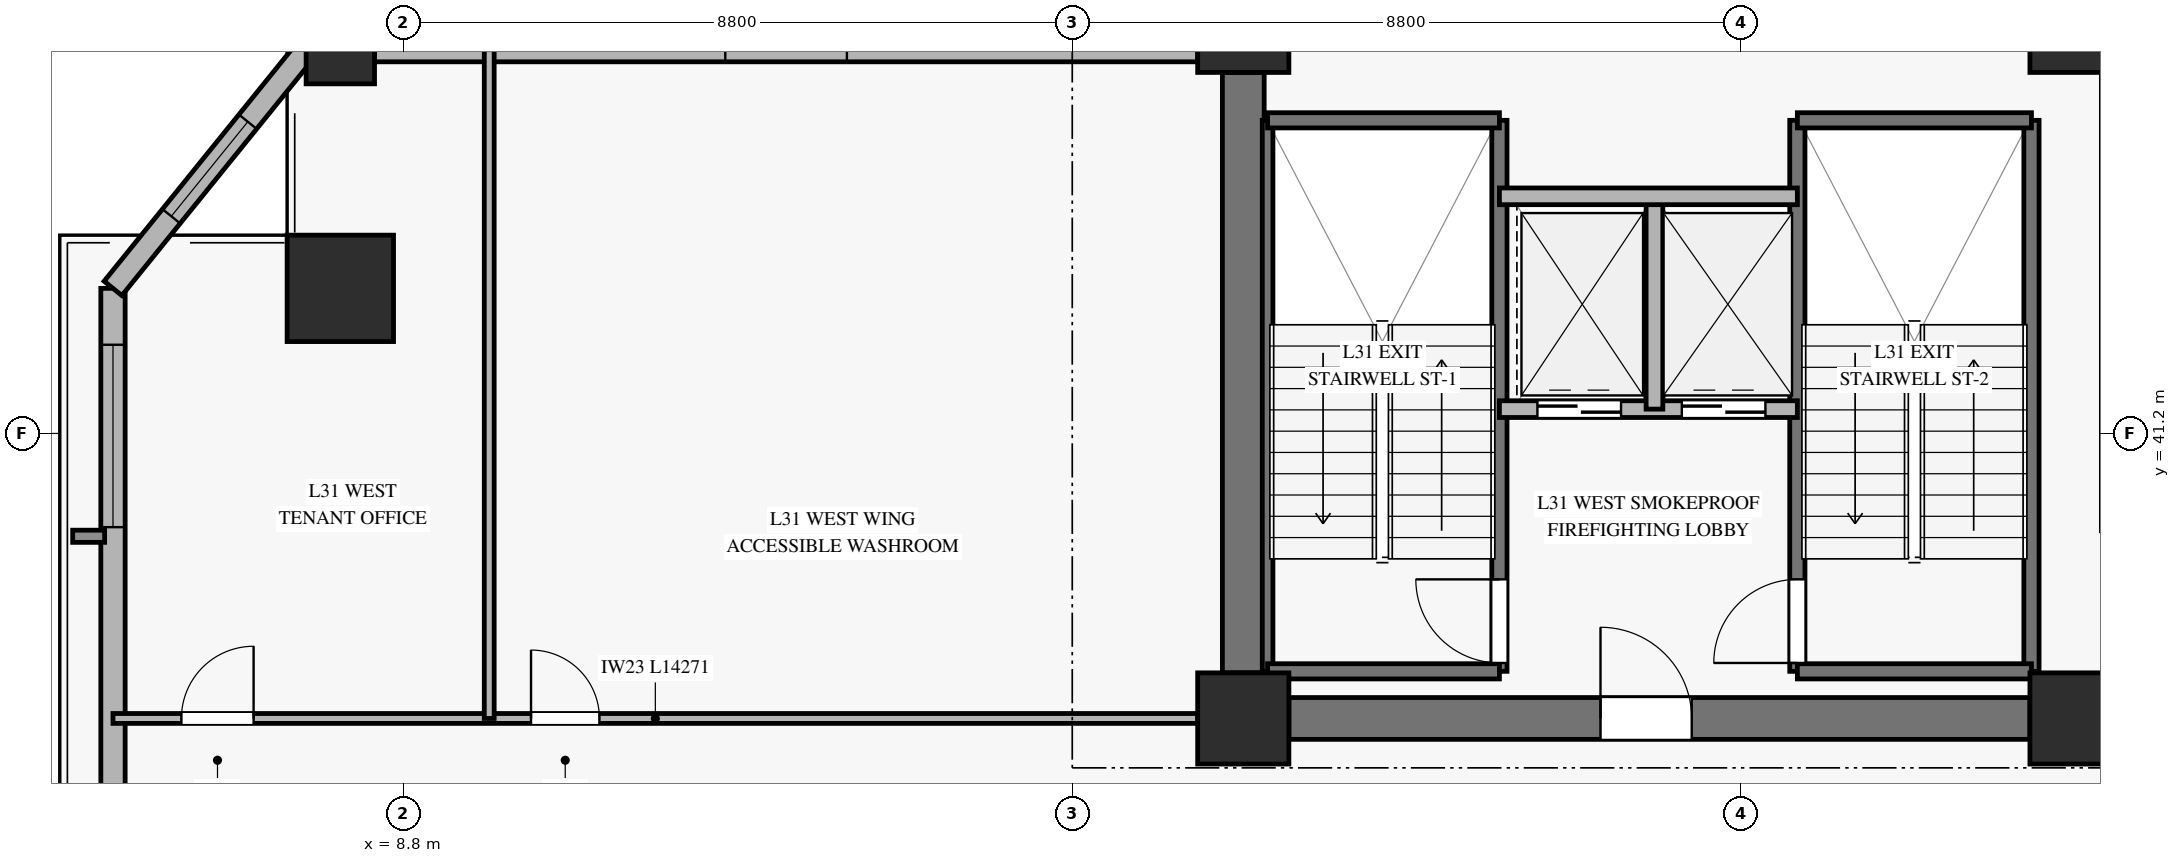
"""IFC4 building model, lengths in metres.
Left out: names, types, materials, properties, quantities, classifications, styles, units other than length and angle.
Written with IfcOpenShell. Run it as: python <this file> out.ifc"""

import sys

from ifc_helpers import new_model, si_unit, direction, frame, frame_2d, origin, origin_2d, place, context, subcontext, project, spatial, rectangle, hollow_rectangle, extrude, source, transform, mapped, element, fill, save


model = new_model("IFC4")
c1 = context("Model", 3, precision=1e-05, world=origin(), true_north=direction((0.0, 1.0)))
c2 = subcontext(c1, "Body", "Model", "MODEL_VIEW")
j1 = project(units=[si_unit("LENGTHUNIT", "METRE"), si_unit("PLANEANGLEUNIT", "RADIAN")], contexts=[c1])
p1 = place(None, origin())
s1 = spatial("IfcSite", under=j1, at=p1, CompositionType="ELEMENT")
p2 = place(p1, origin())
s2 = spatial("IfcBuilding", under=s1, at=p2, CompositionType="ELEMENT")
p3 = place(p2, frame((0.0, 0.0, 127.0)))
s3 = spatial("IfcBuildingStorey", under=s2, at=p3, CompositionType="ELEMENT", Elevation=127.0)
m1 = source(origin(), c2, "Body", "SweptSolid", [
    extrude(rectangle(XDim=1.2, YDim=1.2, at=origin_2d()), origin(), (0.0, 0.0, 1.0), 3.64),
])
for number, where, z_axis, x_axis in (
    (1, (19.85, 37.45, 0.0), (0.0, 0.0, 1.0), (1.0, 0.0, 0.0)),
    (2, (19.85, 46.55, 0.0), (0.0, 0.0, 1.0), (1.0, 0.0, 0.0)),
    (3, (30.8, 37.45, 0.0), (0.0, 0.0, 1.0), (1.0, 0.0, 0.0)),
    (4, (30.8, 46.55, 0.0), (0.0, 0.0, 1.0), (1.0, 0.0, 0.0)),
):
    element("IfcColumn", number, at=place(p3, frame(where, z_axis=z_axis, x_axis=x_axis)), inside=s3, PredefinedType="PILASTER", context=c2, shape_type="MappedRepresentation", body=[
        mapped(m1, transform((0.0, 0.0, 0.0), x_axis=(1.0, 0.0, 0.0), y_axis=(0.0, 1.0, 0.0), z_axis=(0.0, 0.0, 1.0), scale=1.0)),
    ])
p4 = place(p3, frame((20.45, 37.45, 0.0), z_axis=(0.0, 0.0, 1.0), x_axis=(1.0, 0.0, 0.0)))
e5 = element("IfcWall", 5, at=p4, inside=s3, PredefinedType="SHEAR", context=c2, shape_type="SweptSolid", body=[
    extrude(rectangle(XDim=9.75, YDim=0.55, at=frame_2d((4.875, 0.0))), origin(), (0.0, 0.0, 1.0), 3.64),
])
p5 = place(p4, frame((4.1, 0.0, 0.0)))
e6 = element("IfcOpeningElement", 6, at=p5, cuts=e5, PredefinedType="OPENING", context=c2, shape_type="SweptSolid", body=[
    extrude(rectangle(XDim=1.2, YDim=2.15, at=frame_2d((0.6, 1.075))), frame((0.0, 0.285, 0.0), z_axis=(0.0, -1.0, 0.0), x_axis=(1.0, 0.0, 0.0)), (0.0, 0.0, 1.0), 0.57),
])
p6 = place(p3, frame((19.85, 38.05, 0.0), z_axis=(0.0, 0.0, 1.0), x_axis=(0.0, 1.0, 0.0)))
e7 = element("IfcWall", 7, at=p6, inside=s3, PredefinedType="SHEAR", context=c2, shape_type="SweptSolid", body=[
    extrude(rectangle(XDim=7.9, YDim=0.55, at=frame_2d((3.95, 0.0))), origin(), (0.0, 0.0, 1.0), 3.64),
])
m2 = source(origin(), c2, "Body", "SweptSolid", [
    extrude(hollow_rectangle(XDim=1.4, YDim=1.4, WallThickness=0.065, at=origin_2d()), origin(), (0.0, 0.0, 1.0), 3.64),
])
p7 = place(p3, frame((7.97, 43.109, 0.0), z_axis=(0.0, 0.0, 1.0), x_axis=(1.0, 0.0, 0.0)))
e8 = element("IfcColumn", 8, at=p7, inside=s3, PredefinedType="COLUMN", context=c2, shape_type="MappedRepresentation", body=[
    mapped(m2, transform((0.0, 0.0, 0.0), x_axis=(1.0, 0.0, 0.0), y_axis=(0.0, 1.0, 0.0), z_axis=(0.0, 0.0, 1.0), scale=1.0)),
])
m3 = source(origin(), c2, "Body", "SweptSolid", [
    extrude(hollow_rectangle(XDim=0.9, YDim=0.9, WallThickness=0.04, at=origin_2d()), origin(), (0.0, 0.0, 1.0), 3.64),
])
p8 = place(p3, frame((7.97, 46.25, 0.0), z_axis=(0.0, 0.0, 1.0), x_axis=(1.0, 0.0, 0.0)))
e9 = element("IfcColumn", 9, at=p8, inside=s3, PredefinedType="COLUMN", context=c2, shape_type="MappedRepresentation", body=[
    mapped(m3, transform((0.0, 0.0, 0.0), x_axis=(1.0, 0.0, 0.0), y_axis=(0.0, 1.0, 0.0), z_axis=(0.0, 0.0, 1.0), scale=1.0)),
])
p9 = place(p3, frame((4.979, 27.259, 0.0), z_axis=(0.0, 0.0, 1.0), x_axis=(0.0, 1.0, 0.0)))
e10 = element("IfcWall", 10, at=p9, inside=s3, PredefinedType="SOLIDWALL", context=c2, shape_type="SweptSolid", body=[
    extrude(rectangle(XDim=15.85, YDim=0.32, at=frame_2d((7.925, 0.0))), origin(), (0.0, 0.0, 1.0), 3.12),
])
p10 = place(p9, frame((2.241, 0.0, 0.45)))
e11 = element("IfcOpeningElement", 11, at=p10, cuts=e10, PredefinedType="OPENING", context=c2, shape_type="SweptSolid", body=[
    extrude(rectangle(XDim=2.4, YDim=2.1, at=frame_2d((1.2, 1.05))), frame((0.0, 0.17, 0.0), z_axis=(0.0, -1.0, 0.0), x_axis=(1.0, 0.0, 0.0)), (0.0, 0.0, 1.0), 0.34),
])
p11 = place(p9, frame((12.708, 0.0, 0.45)))
e12 = element("IfcOpeningElement", 12, at=p11, cuts=e10, PredefinedType="OPENING", context=c2, shape_type="SweptSolid", body=[
    extrude(rectangle(XDim=2.4, YDim=2.1, at=frame_2d((1.2, 1.05))), frame((0.0, 0.17, 0.0), z_axis=(0.0, -1.0, 0.0), x_axis=(1.0, 0.0, 0.0)), (0.0, 0.0, 1.0), 0.34),
])
p12 = place(p3, frame((8.42, 46.25, 0.0), z_axis=(0.0, 0.0, 1.0), x_axis=(1.0, 0.0, 0.0)))
e13 = element("IfcWall", 13, at=p12, inside=s3, PredefinedType="SOLIDWALL", context=c2, shape_type="SweptSolid", body=[
    extrude(rectangle(XDim=10.83, YDim=0.32, at=frame_2d((5.415, 0.0))), origin(), (0.0, 0.0, 1.0), 3.12),
])
p13 = place(p12, frame((4.615, 0.0, 0.45)))
e14 = element("IfcOpeningElement", 14, at=p13, cuts=e13, PredefinedType="OPENING", context=c2, shape_type="SweptSolid", body=[
    extrude(rectangle(XDim=1.6, YDim=2.0, at=frame_2d((0.8, 1.0))), frame((0.0, 0.17, 0.0), z_axis=(0.0, -1.0, 0.0), x_axis=(1.0, 0.0, 0.0)), (0.0, 0.0, 1.0), 0.34),
])
p14 = place(p3, frame((7.52, 46.25, 0.0), z_axis=(0.0, 0.0, 1.0), x_axis=(-0.62893048879, -0.7774615362, 0.0)))
e15 = element("IfcWall", 15, at=p14, inside=s3, PredefinedType="SOLIDWALL", context=c2, shape_type="SweptSolid", body=[
    extrude(rectangle(XDim=4.04, YDim=0.3, at=frame_2d((2.02, 0.0))), origin(), (0.0, 0.0, 1.0), 3.12),
])
p15 = place(p14, frame((1.22, 0.0, 0.45)))
e16 = element("IfcOpeningElement", 16, at=p15, cuts=e15, PredefinedType="OPENING", context=c2, shape_type="SweptSolid", body=[
    extrude(rectangle(XDim=1.6, YDim=2.0, at=frame_2d((0.8, 1.0))), frame((0.0, 0.16, 0.0), z_axis=(0.0, -1.0, 0.0), x_axis=(1.0, 0.0, 0.0)), (0.0, 0.0, 1.0), 0.32),
])
p16 = place(p3, frame((20.17, 38.07, 0.0), z_axis=(0.0, 0.0, 1.0), x_axis=(0.0, 1.0, 0.0)))
e17 = element("IfcWall", 17, at=p16, inside=s3, PredefinedType="SOLIDWALL", context=c2, shape_type="SweptSolid", body=[
    extrude(rectangle(XDim=7.25, YDim=0.14, at=frame_2d((3.625, 0.0))), origin(), (0.0, 0.0, 1.0), 3.9),
])
p17 = place(p3, frame((23.22, 38.07, 0.0), z_axis=(0.0, 0.0, 1.0), x_axis=(0.0, 1.0, 0.0)))
e18 = element("IfcWall", 18, at=p17, inside=s3, PredefinedType="SOLIDWALL", context=c2, shape_type="SweptSolid", body=[
    extrude(rectangle(XDim=7.25, YDim=0.2, at=frame_2d((3.625, 0.0))), origin(), (0.0, 0.0, 1.0), 3.9),
])
p18 = place(p17, frame((0.11, 0.0, 0.0)))
e19 = element("IfcOpeningElement", 19, at=p18, cuts=e18, PredefinedType="OPENING", context=c2, shape_type="SweptSolid", body=[
    extrude(rectangle(XDim=1.1, YDim=2.15, at=frame_2d((0.55, 1.075))), frame((0.0, 0.11, 0.0), z_axis=(0.0, -1.0, 0.0), x_axis=(1.0, 0.0, 0.0)), (0.0, 0.0, 1.0), 0.22),
])
for number, where, z_axis, x_axis in (
    (20, (20.17, 45.32, 0.0), (0.0, 0.0, 1.0), (1.0, 0.0, 0.0)),
    (21, (20.17, 38.07, 0.0), (0.0, 0.0, 1.0), (1.0, 0.0, 0.0)),
):
    element("IfcWall", number, at=place(p3, frame(where, z_axis=z_axis, x_axis=x_axis)), inside=s3, PredefinedType="SOLIDWALL", context=c2, shape_type="SweptSolid", body=[
        extrude(rectangle(XDim=3.05, YDim=0.2, at=frame_2d((1.525, 0.0))), origin(), (0.0, 0.0, 1.0), 3.9),
    ])
p19 = place(p3, frame((27.14, 38.07, 0.0), z_axis=(0.0, 0.0, 1.0), x_axis=(0.0, 1.0, 0.0)))
e22 = element("IfcWall", 22, at=p19, inside=s3, PredefinedType="SOLIDWALL", context=c2, shape_type="SweptSolid", body=[
    extrude(rectangle(XDim=7.25, YDim=0.2, at=frame_2d((3.625, 0.0))), origin(), (0.0, 0.0, 1.0), 3.9),
])
p20 = place(p19, frame((0.11, 0.0, 0.0)))
e23 = element("IfcOpeningElement", 23, at=p20, cuts=e22, PredefinedType="OPENING", context=c2, shape_type="SweptSolid", body=[
    extrude(rectangle(XDim=1.1, YDim=2.15, at=frame_2d((0.55, 1.075))), frame((0.0, 0.11, 0.0), z_axis=(0.0, -1.0, 0.0), x_axis=(1.0, 0.0, 0.0)), (0.0, 0.0, 1.0), 0.22),
])
p21 = place(p3, frame((30.22, 38.07, 0.0), z_axis=(0.0, 0.0, 1.0), x_axis=(0.0, 1.0, 0.0)))
e24 = element("IfcWall", 24, at=p21, inside=s3, PredefinedType="SOLIDWALL", context=c2, shape_type="SweptSolid", body=[
    extrude(rectangle(XDim=7.25, YDim=0.2, at=frame_2d((3.625, 0.0))), origin(), (0.0, 0.0, 1.0), 3.9),
])
for number, where, z_axis, x_axis in (
    (25, (27.14, 45.32, 0.0), (0.0, 0.0, 1.0), (1.0, 0.0, 0.0)),
    (26, (27.14, 38.07, 0.0), (0.0, 0.0, 1.0), (1.0, 0.0, 0.0)),
):
    element("IfcWall", number, at=place(p3, frame(where, z_axis=z_axis, x_axis=x_axis)), inside=s3, PredefinedType="SOLIDWALL", context=c2, shape_type="SweptSolid", body=[
        extrude(rectangle(XDim=3.08, YDim=0.2, at=frame_2d((1.54, 0.0))), origin(), (0.0, 0.0, 1.0), 3.9),
    ])
p22 = place(p3, frame((23.22, 41.52, 0.0), z_axis=(0.0, 0.0, 1.0), x_axis=(1.0, 0.0, 0.0)))
e27 = element("IfcWall", 27, at=p22, inside=s3, PredefinedType="SOLIDWALL", context=c2, shape_type="SweptSolid", body=[
    extrude(rectangle(XDim=3.92, YDim=0.22, at=frame_2d((1.96, 0.0))), origin(), (0.0, 0.0, 1.0), 3.64),
])
p23 = place(p22, frame((0.5, 0.0, 0.0)))
e28 = element("IfcOpeningElement", 28, at=p23, cuts=e27, PredefinedType="OPENING", context=c2, shape_type="SweptSolid", body=[
    extrude(rectangle(XDim=1.1, YDim=2.2, at=frame_2d((0.55, 1.1))), frame((0.0, 0.12, 0.0), z_axis=(0.0, -1.0, 0.0), x_axis=(1.0, 0.0, 0.0)), (0.0, 0.0, 1.0), 0.24),
])
p24 = place(p22, frame((2.4, 0.0, 0.0)))
e29 = element("IfcOpeningElement", 29, at=p24, cuts=e27, PredefinedType="OPENING", context=c2, shape_type="SweptSolid", body=[
    extrude(rectangle(XDim=1.1, YDim=2.2, at=frame_2d((0.55, 1.1))), frame((0.0, 0.12, 0.0), z_axis=(0.0, -1.0, 0.0), x_axis=(1.0, 0.0, 0.0)), (0.0, 0.0, 1.0), 0.24),
])
p25 = place(p3, frame((25.26, 41.52, 0.0), z_axis=(0.0, 0.0, 1.0), x_axis=(0.0, 1.0, 0.0)))
e30 = element("IfcWall", 30, at=p25, inside=s3, PredefinedType="SOLIDWALL", context=c2, shape_type="SweptSolid", body=[
    extrude(rectangle(XDim=2.8, YDim=0.22, at=frame_2d((1.4, 0.0))), origin(), (0.0, 0.0, 1.0), 3.64),
])
p26 = place(p3, frame((23.22, 44.32, 0.0), z_axis=(0.0, 0.0, 1.0), x_axis=(1.0, 0.0, 0.0)))
e31 = element("IfcWall", 31, at=p26, inside=s3, PredefinedType="SOLIDWALL", context=c2, shape_type="SweptSolid", body=[
    extrude(rectangle(XDim=3.92, YDim=0.22, at=frame_2d((1.96, 0.0))), origin(), (0.0, 0.0, 1.0), 3.64),
])
p27 = place(p3, frame((4.979, 37.45, 0.0), z_axis=(0.0, 0.0, 1.0), x_axis=(1.0, 0.0, 0.0)))
e32 = element("IfcWall", 32, at=p27, inside=s3, PredefinedType="PARTITIONING", context=c2, shape_type="SweptSolid", body=[
    extrude(rectangle(XDim=14.271, YDim=0.13, at=frame_2d((7.135, 0.0))), origin(), (0.0, 0.0, 1.0), 3.125),
])
p28 = place(p27, frame((0.9, 0.0, 0.0)))
e33 = element("IfcOpeningElement", 33, at=p28, cuts=e32, PredefinedType="OPENING", context=c2, shape_type="SweptSolid", body=[
    extrude(rectangle(XDim=0.95, YDim=2.1, at=frame_2d((0.475, 1.05))), frame((0.0, 0.075, 0.0), z_axis=(0.0, -1.0, 0.0), x_axis=(1.0, 0.0, 0.0)), (0.0, 0.0, 1.0), 0.15),
])
p29 = place(p27, frame((5.5, 0.0, 0.0)))
e34 = element("IfcOpeningElement", 34, at=p29, cuts=e32, PredefinedType="OPENING", context=c2, shape_type="SweptSolid", body=[
    extrude(rectangle(XDim=0.9, YDim=2.1, at=frame_2d((0.45, 1.05))), frame((0.0, 0.075, 0.0), z_axis=(0.0, -1.0, 0.0), x_axis=(1.0, 0.0, 0.0)), (0.0, 0.0, 1.0), 0.15),
])
p30 = place(p3, frame((9.929, 37.45, 0.0), z_axis=(0.0, 0.0, 1.0), x_axis=(0.0, 1.0, 0.0)))
e35 = element("IfcWall", 35, at=p30, inside=s3, PredefinedType="PARTITIONING", context=c2, shape_type="SweptSolid", body=[
    extrude(rectangle(XDim=8.8, YDim=0.13, at=frame_2d((4.4, 0.0))), origin(), (0.0, 0.0, 1.0), 3.64),
])
m4 = source(origin(), c2, "Body", "SweptSolid", [
    extrude(rectangle(XDim=2.4, YDim=2.1, at=frame_2d((1.2, 1.05))), frame((0.0, 0.03, 0.0), z_axis=(0.0, -1.0, 0.0), x_axis=(1.0, 0.0, 0.0)), (0.0, 0.0, 1.0), 0.06),
])
p31 = place(p11, origin())
e36 = element("IfcWindow", 36, at=p31, inside=s3, PartitioningType="SINGLE_PANEL", PredefinedType="WINDOW", context=c2, shape_type="MappedRepresentation", body=[
    mapped(m4, transform((0.0, 0.0, 0.0), x_axis=(1.0, 0.0, 0.0), y_axis=(0.0, 1.0, 0.0), z_axis=(0.0, 0.0, 1.0), scale=1.0)),
])
fill(e12, e36)
m5 = source(origin(), c2, "Body", "SweptSolid", [
    extrude(rectangle(XDim=1.6, YDim=2.0, at=frame_2d((0.8, 1.0))), frame((0.0, 0.03, 0.0), z_axis=(0.0, -1.0, 0.0), x_axis=(1.0, 0.0, 0.0)), (0.0, 0.0, 1.0), 0.06),
])
p32 = place(p15, origin())
e37 = element("IfcWindow", 37, at=p32, inside=s3, PartitioningType="SINGLE_PANEL", PredefinedType="WINDOW", context=c2, shape_type="MappedRepresentation", body=[
    mapped(m5, transform((0.0, 0.0, 0.0), x_axis=(1.0, 0.0, 0.0), y_axis=(0.0, 1.0, 0.0), z_axis=(0.0, 0.0, 1.0), scale=1.0)),
])
fill(e16, e37)
m6 = source(origin(), c2, "Body", "SweptSolid", [
    extrude(rectangle(XDim=1.1, YDim=2.15, at=frame_2d((0.55, 1.075))), frame((0.0, 0.025, 0.0), z_axis=(0.0, -1.0, 0.0), x_axis=(1.0, 0.0, 0.0)), (0.0, 0.0, 1.0), 0.05),
])
p33 = place(p18, origin())
e38 = element("IfcDoor", 38, at=p33, inside=s3, OperationType="SINGLE_SWING_RIGHT", PredefinedType="DOOR", context=c2, shape_type="MappedRepresentation", body=[
    mapped(m6, transform((0.0, 0.0, 0.0), x_axis=(1.0, 0.0, 0.0), y_axis=(0.0, 1.0, 0.0), z_axis=(0.0, 0.0, 1.0), scale=1.0)),
])
fill(e19, e38)
p34 = place(p20, origin())
e39 = element("IfcDoor", 39, at=p34, inside=s3, OperationType="SINGLE_SWING_LEFT", PredefinedType="DOOR", context=c2, shape_type="MappedRepresentation", body=[
    mapped(m6, transform((0.0, 0.0, 0.0), x_axis=(1.0, 0.0, 0.0), y_axis=(0.0, 1.0, 0.0), z_axis=(0.0, 0.0, 1.0), scale=1.0)),
])
fill(e23, e39)
m7 = source(origin(), c2, "Body", "SweptSolid", [
    extrude(rectangle(XDim=1.1, YDim=2.2, at=frame_2d((0.55, 1.1))), frame((0.0, 0.025, 0.0), z_axis=(0.0, -1.0, 0.0), x_axis=(1.0, 0.0, 0.0)), (0.0, 0.0, 1.0), 0.05),
])
p35 = place(p23, origin())
e40 = element("IfcDoor", 40, at=p35, inside=s3, OperationType="SLIDING_TO_LEFT", PredefinedType="DOOR", context=c2, shape_type="MappedRepresentation", body=[
    mapped(m7, transform((0.0, 0.0, 0.0), x_axis=(1.0, 0.0, 0.0), y_axis=(0.0, 1.0, 0.0), z_axis=(0.0, 0.0, 1.0), scale=1.0)),
])
fill(e28, e40)
p36 = place(p24, origin())
e41 = element("IfcDoor", 41, at=p36, inside=s3, OperationType="SLIDING_TO_LEFT", PredefinedType="DOOR", context=c2, shape_type="MappedRepresentation", body=[
    mapped(m7, transform((0.0, 0.0, 0.0), x_axis=(1.0, 0.0, 0.0), y_axis=(0.0, 1.0, 0.0), z_axis=(0.0, 0.0, 1.0), scale=1.0)),
])
fill(e29, e41)
m8 = source(origin(), c2, "Body", "SweptSolid", [
    extrude(rectangle(XDim=1.2, YDim=2.15, at=frame_2d((0.6, 1.075))), frame((0.0, 0.025, 0.0), z_axis=(0.0, -1.0, 0.0), x_axis=(1.0, 0.0, 0.0)), (0.0, 0.0, 1.0), 0.05),
])
p37 = place(p5, origin())
e42 = element("IfcDoor", 42, at=p37, inside=s3, OperationType="SINGLE_SWING_LEFT", PredefinedType="DOOR", context=c2, shape_type="MappedRepresentation", body=[
    mapped(m8, transform((0.0, 0.0, 0.0), x_axis=(1.0, 0.0, 0.0), y_axis=(0.0, 1.0, 0.0), z_axis=(0.0, 0.0, 1.0), scale=1.0)),
])
fill(e6, e42)
m9 = source(origin(), c2, "Body", "SweptSolid", [
    extrude(rectangle(XDim=0.95, YDim=2.1, at=frame_2d((0.475, 1.05))), frame((0.0, 0.025, 0.0), z_axis=(0.0, -1.0, 0.0), x_axis=(1.0, 0.0, 0.0)), (0.0, 0.0, 1.0), 0.05),
])
p38 = place(p28, origin())
e43 = element("IfcDoor", 43, at=p38, inside=s3, OperationType="SINGLE_SWING_RIGHT", PredefinedType="DOOR", context=c2, shape_type="MappedRepresentation", body=[
    mapped(m9, transform((0.0, 0.0, 0.0), x_axis=(1.0, 0.0, 0.0), y_axis=(0.0, 1.0, 0.0), z_axis=(0.0, 0.0, 1.0), scale=1.0)),
])
fill(e33, e43)
m10 = source(origin(), c2, "Body", "SweptSolid", [
    extrude(rectangle(XDim=0.9, YDim=2.1, at=frame_2d((0.45, 1.05))), frame((0.0, 0.025, 0.0), z_axis=(0.0, -1.0, 0.0), x_axis=(1.0, 0.0, 0.0)), (0.0, 0.0, 1.0), 0.05),
])
p39 = place(p29, origin())
e44 = element("IfcDoor", 44, at=p39, inside=s3, OperationType="SINGLE_SWING_LEFT", PredefinedType="DOOR", context=c2, shape_type="MappedRepresentation", body=[
    mapped(m10, transform((0.0, 0.0, 0.0), x_axis=(1.0, 0.0, 0.0), y_axis=(0.0, 1.0, 0.0), z_axis=(0.0, 0.0, 1.0), scale=1.0)),
])
fill(e34, e44)
save(model, sys.argv[1])
